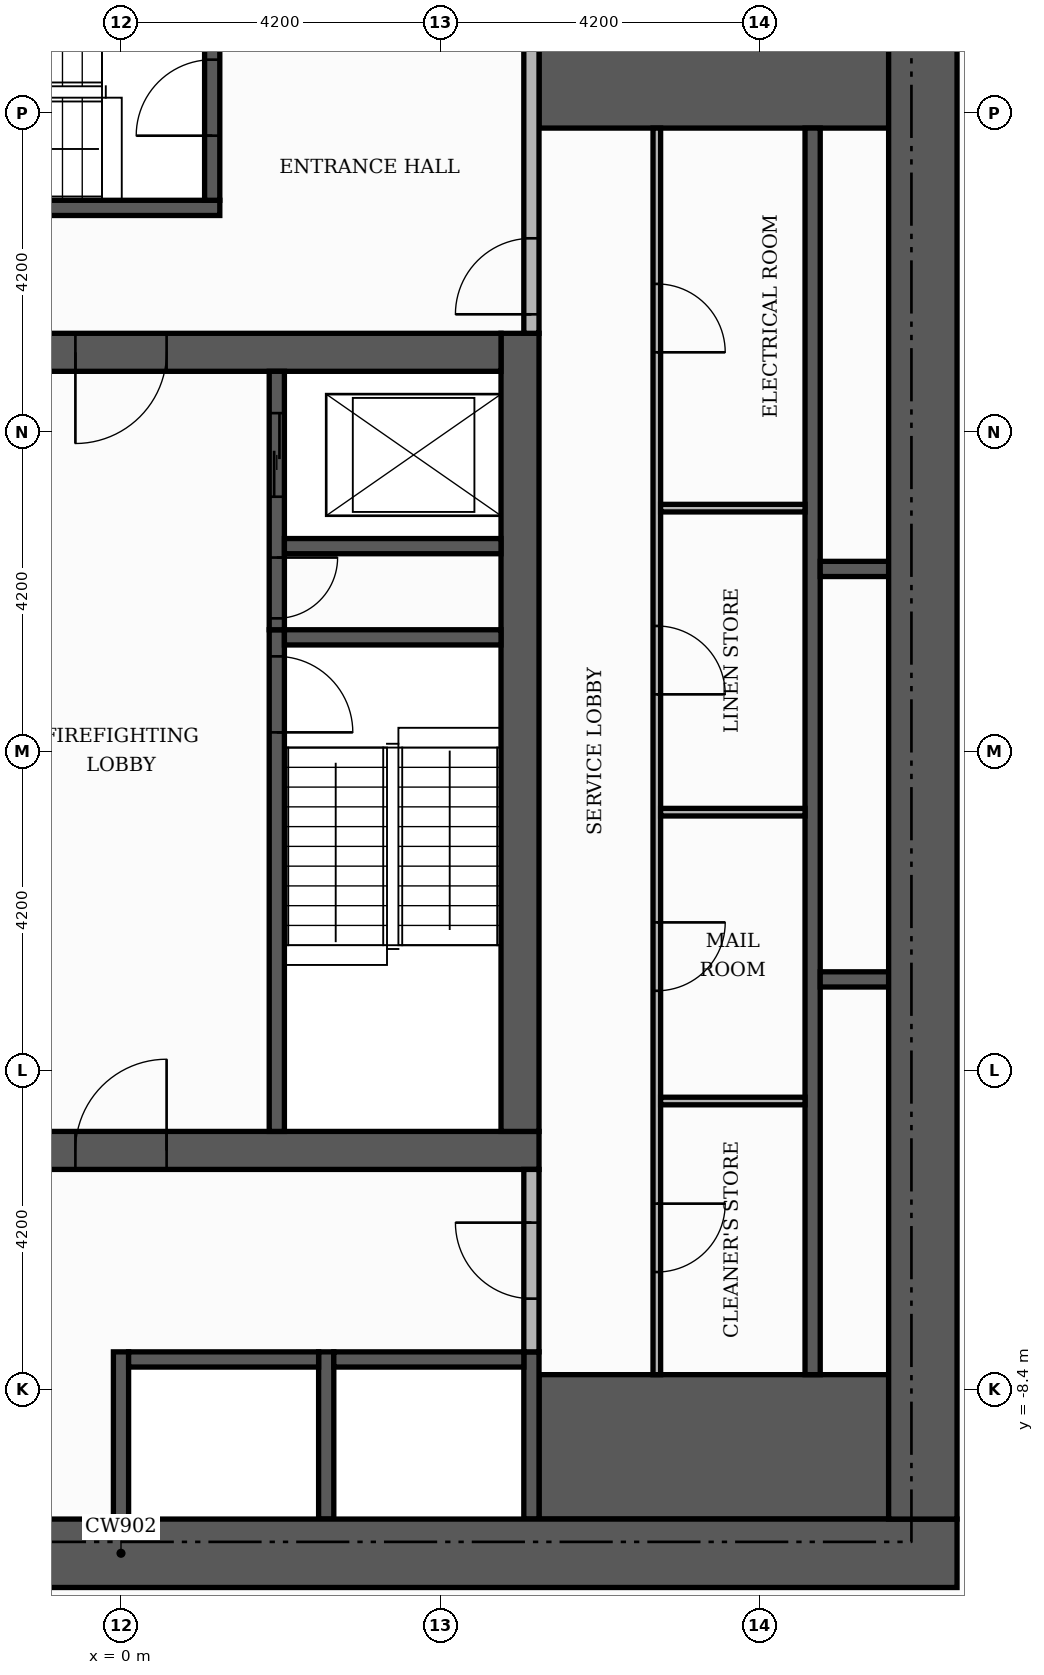
"""IFC4 building model, lengths in metres.
Left out: names, types, materials, properties, quantities, classifications, styles, units other than length and angle.
Written with IfcOpenShell. Run it as: python <this file> out.ifc"""

import sys

from ifc_helpers import new_model, si_unit, direction, frame, frame_2d, origin, place, context, subcontext, project, spatial, rectangle, extrude, element, fill, save


model = new_model("IFC4")
c1 = context("Model", 3, precision=1e-05, world=origin(), true_north=direction((0.0, 1.0)))
c2 = subcontext(c1, "Body", "Model", "MODEL_VIEW")
j1 = project(units=[si_unit("LENGTHUNIT", "METRE"), si_unit("PLANEANGLEUNIT", "RADIAN")], contexts=[c1])
p1 = place(None, origin())
s1 = spatial("IfcSite", under=j1, at=p1, CompositionType="ELEMENT")
p2 = place(p1, origin())
s2 = spatial("IfcBuilding", under=s1, at=p2, CompositionType="ELEMENT")
p3 = place(p2, frame((0.0, 0.0, 114.3)))
s3 = spatial("IfcBuildingStorey", under=s2, at=p3, CompositionType="ELEMENT", Elevation=114.3)
p4 = place(p3, frame((-5.5, -5.25, 0.0), z_axis=(0.0, 0.0, 1.0), x_axis=(1.0, 0.0, 0.0)))
e1 = element("IfcWall", 1, at=p4, inside=s3, PredefinedType="SHEAR", context=c2, shape_type="SweptSolid", body=[
    extrude(rectangle(XDim=11.0, YDim=0.5, at=frame_2d((5.5, 0.0))), origin(), (0.0, 0.0, 1.0), 3.48),
])
p5 = place(p4, frame((4.9, 0.0, 0.0)))
e2 = element("IfcOpeningElement", 2, at=p5, cuts=e1, PredefinedType="OPENING", context=c2, shape_type="SweptSolid", body=[
    extrude(rectangle(XDim=1.2, YDim=2.1, at=frame_2d((0.6, 1.05))), frame((0.0, 0.26, 0.0), z_axis=(0.0, -1.0, 0.0), x_axis=(1.0, 0.0, 0.0)), (0.0, 0.0, 1.0), 0.52),
])
p6 = place(p3, frame((5.25, -5.0, 0.0), z_axis=(0.0, 0.0, 1.0), x_axis=(0.0, 1.0, 0.0)))
e3 = element("IfcWall", 3, at=p6, inside=s3, PredefinedType="SHEAR", context=c2, shape_type="SweptSolid", body=[
    extrude(rectangle(XDim=10.5, YDim=0.5, at=frame_2d((5.25, 0.0))), origin(), (0.0, 0.0, 1.0), 3.48),
])
p7 = place(p3, frame((-5.0, 5.25, 0.0), z_axis=(0.0, 0.0, 1.0), x_axis=(1.0, 0.0, 0.0)))
e4 = element("IfcWall", 4, at=p7, inside=s3, PredefinedType="SHEAR", context=c2, shape_type="SweptSolid", body=[
    extrude(rectangle(XDim=10.0, YDim=0.5, at=frame_2d((5.0, 0.0))), origin(), (0.0, 0.0, 1.0), 3.48),
])
p8 = place(p7, frame((4.4, 0.0, 0.0)))
e5 = element("IfcOpeningElement", 5, at=p8, cuts=e4, PredefinedType="OPENING", context=c2, shape_type="SweptSolid", body=[
    extrude(rectangle(XDim=1.2, YDim=2.1, at=frame_2d((0.6, 1.05))), frame((0.0, 0.26, 0.0), z_axis=(0.0, -1.0, 0.0), x_axis=(1.0, 0.0, 0.0)), (0.0, 0.0, 1.0), 0.52),
])
for number, where, z_axis, x_axis in (
    (6, (5.5, -9.15, 0.0), (0.0, 0.0, 1.0), (1.0, 0.0, 0.0)),
    (7, (5.5, 9.15, 0.0), (0.0, 0.0, 1.0), (1.0, 0.0, 0.0)),
):
    element("IfcWall", number, at=place(p3, frame(where, z_axis=z_axis, x_axis=x_axis)), inside=s3, PredefinedType="SHEAR", context=c2, shape_type="SweptSolid", body=[
        extrude(rectangle(XDim=4.6, YDim=1.9, at=frame_2d((2.3, 0.0))), origin(), (0.0, 0.0, 1.0), 3.48),
    ])
p9 = place(p3, frame((2.05, -5.0, 0.0), z_axis=(0.0, 0.0, 1.0), x_axis=(0.0, 1.0, 0.0)))
e8 = element("IfcWall", 8, at=p9, inside=s3, PredefinedType="SHEAR", context=c2, shape_type="SweptSolid", body=[
    extrude(rectangle(XDim=6.6, YDim=0.2, at=frame_2d((3.3, 0.0))), origin(), (0.0, 0.0, 1.0), 3.48),
])
p10 = place(p9, frame((5.25, 0.0, 0.0)))
e9 = element("IfcOpeningElement", 9, at=p10, cuts=e8, PredefinedType="OPENING", context=c2, shape_type="SweptSolid", body=[
    extrude(rectangle(XDim=1.0, YDim=2.1, at=frame_2d((0.5, 1.05))), frame((0.0, 0.11, 0.0), z_axis=(0.0, -1.0, 0.0), x_axis=(1.0, 0.0, 0.0)), (0.0, 0.0, 1.0), 0.22),
])
p11 = place(p3, frame((2.15, 1.5, 0.0), z_axis=(0.0, 0.0, 1.0), x_axis=(1.0, 0.0, 0.0)))
e10 = element("IfcWall", 10, at=p11, inside=s3, PredefinedType="SHEAR", context=c2, shape_type="SweptSolid", body=[
    extrude(rectangle(XDim=2.85, YDim=0.2, at=frame_2d((1.425, 0.0))), origin(), (0.0, 0.0, 1.0), 3.48),
])
p12 = place(p3, frame((-5.5, 7.15, 0.0), z_axis=(0.0, 0.0, 1.0), x_axis=(1.0, 0.0, 0.0)))
e11 = element("IfcWall", 11, at=p12, inside=s3, PredefinedType="SHEAR", context=c2, shape_type="SweptSolid", body=[
    extrude(rectangle(XDim=6.8, YDim=0.2, at=frame_2d((3.4, 0.0))), origin(), (0.0, 0.0, 1.0), 3.48),
])
p13 = place(p3, frame((1.2, 7.25, 0.0), z_axis=(0.0, 0.0, 1.0), x_axis=(0.0, 1.0, 0.0)))
e12 = element("IfcWall", 12, at=p13, inside=s3, PredefinedType="SHEAR", context=c2, shape_type="SweptSolid", body=[
    extrude(rectangle(XDim=2.85, YDim=0.2, at=frame_2d((1.425, 0.0))), origin(), (0.0, 0.0, 1.0), 3.48),
])
p14 = place(p13, frame((0.85, 0.0, 0.0)))
e13 = element("IfcOpeningElement", 13, at=p14, cuts=e12, PredefinedType="OPENING", context=c2, shape_type="SweptSolid", body=[
    extrude(rectangle(XDim=1.0, YDim=2.1, at=frame_2d((0.5, 1.05))), frame((0.0, 0.11, 0.0), z_axis=(0.0, -1.0, 0.0), x_axis=(1.0, 0.0, 0.0)), (0.0, 0.0, 1.0), 0.22),
])
for number, where, z_axis, x_axis in (
    (14, (0.0, -10.1, 0.0), (0.0, 0.0, 1.0), (0.0, 1.0, 0.0)),
    (15, (2.7, -10.1, 0.0), (0.0, 0.0, 1.0), (0.0, 1.0, 0.0)),
    (16, (5.4, -10.1, 0.0), (0.0, 0.0, 1.0), (0.0, 1.0, 0.0)),
):
    element("IfcWall", number, at=place(p3, frame(where, z_axis=z_axis, x_axis=x_axis)), inside=s3, PredefinedType="SHEAR", context=c2, shape_type="SweptSolid", body=[
        extrude(rectangle(XDim=2.2, YDim=0.2, at=frame_2d((1.1, 0.0))), origin(), (0.0, 0.0, 1.0), 3.48),
    ])
p15 = place(p3, frame((9.1, -8.2, 0.0), z_axis=(0.0, 0.0, 1.0), x_axis=(0.0, 1.0, 0.0)))
e17 = element("IfcWall", 17, at=p15, inside=s3, PredefinedType="SHEAR", context=c2, shape_type="SweptSolid", body=[
    extrude(rectangle(XDim=16.4, YDim=0.2, at=frame_2d((8.2, 0.0))), origin(), (0.0, 0.0, 1.0), 3.48),
])
for number, where, z_axis, x_axis in (
    (18, (0.1, -8.0, 0.0), (0.0, 0.0, 1.0), (1.0, 0.0, 0.0)),
    (19, (2.8, -8.0, 0.0), (0.0, 0.0, 1.0), (1.0, 0.0, 0.0)),
):
    element("IfcWall", number, at=place(p3, frame(where, z_axis=z_axis, x_axis=x_axis)), inside=s3, PredefinedType="SHEAR", context=c2, shape_type="SweptSolid", body=[
        extrude(rectangle(XDim=2.5, YDim=0.2, at=frame_2d((1.25, 0.0))), origin(), (0.0, 0.0, 1.0), 3.48),
    ])
p16 = place(p3, frame((9.2, -3.0, 0.0), z_axis=(0.0, 0.0, 1.0), x_axis=(1.0, 0.0, 0.0)))
e20 = element("IfcWall", 20, at=p16, inside=s3, PredefinedType="SHEAR", context=c2, shape_type="SweptSolid", body=[
    extrude(rectangle(XDim=0.9, YDim=0.2, at=frame_2d((0.45, 0.0))), origin(), (0.0, 0.0, 1.0), 3.48),
])
p17 = place(p3, frame((2.05, 1.6, 0.0), z_axis=(0.0, 0.0, 1.0), x_axis=(0.0, 1.0, 0.0)))
e21 = element("IfcWall", 21, at=p17, inside=s3, PredefinedType="SHEAR", context=c2, shape_type="SweptSolid", body=[
    extrude(rectangle(XDim=3.4, YDim=0.2, at=frame_2d((1.7, 0.0))), origin(), (0.0, 0.0, 1.0), 3.48),
])
p18 = place(p17, frame((1.75, 0.0, 0.0)))
e22 = element("IfcOpeningElement", 22, at=p18, cuts=e21, PredefinedType="OPENING", context=c2, shape_type="SweptSolid", body=[
    extrude(rectangle(XDim=1.1, YDim=2.1, at=frame_2d((0.55, 1.05))), frame((0.0, 0.11, 0.0), z_axis=(0.0, -1.0, 0.0), x_axis=(1.0, 0.0, 0.0)), (0.0, 0.0, 1.0), 0.22),
])
p19 = place(p17, frame((0.15, 0.0, 0.0)))
e23 = element("IfcOpeningElement", 23, at=p19, cuts=e21, PredefinedType="OPENING", context=c2, shape_type="SweptSolid", body=[
    extrude(rectangle(XDim=0.8, YDim=2.1, at=frame_2d((0.4, 1.05))), frame((0.0, 0.11, 0.0), z_axis=(0.0, -1.0, 0.0), x_axis=(1.0, 0.0, 0.0)), (0.0, 0.0, 1.0), 0.22),
])
p20 = place(p3, frame((9.2, 2.4, 0.0), z_axis=(0.0, 0.0, 1.0), x_axis=(1.0, 0.0, 0.0)))
e24 = element("IfcWall", 24, at=p20, inside=s3, PredefinedType="SHEAR", context=c2, shape_type="SweptSolid", body=[
    extrude(rectangle(XDim=0.9, YDim=0.2, at=frame_2d((0.45, 0.0))), origin(), (0.0, 0.0, 1.0), 3.48),
])
p21 = place(p3, frame((2.15, 2.7, 0.0), z_axis=(0.0, 0.0, 1.0), x_axis=(1.0, 0.0, 0.0)))
e25 = element("IfcWall", 25, at=p21, inside=s3, PredefinedType="SHEAR", context=c2, shape_type="SweptSolid", body=[
    extrude(rectangle(XDim=2.85, YDim=0.2, at=frame_2d((1.425, 0.0))), origin(), (0.0, 0.0, 1.0), 3.48),
])
p22 = place(p3, frame((-11.0, -10.55, 0.0), z_axis=(0.0, 0.0, 1.0), x_axis=(1.0, 0.0, 0.0)))
e26 = element("IfcWall", 26, at=p22, inside=s3, PredefinedType="SHEAR", context=c2, shape_type="SweptSolid", body=[
    extrude(rectangle(XDim=22.0, YDim=0.9, at=frame_2d((11.0, 0.0))), origin(), (0.0, 0.0, 1.0), 3.48),
])
p23 = place(p22, frame((7.4, 0.0, 0.0)))
e27 = element("IfcOpeningElement", 27, at=p23, cuts=e26, PredefinedType="OPENING", context=c2, shape_type="SweptSolid", body=[
    extrude(rectangle(XDim=1.8, YDim=2.2, at=frame_2d((0.9, 1.1))), frame((0.0, 0.46, 0.0), z_axis=(0.0, -1.0, 0.0), x_axis=(1.0, 0.0, 0.0)), (0.0, 0.0, 1.0), 0.92),
])
p24 = place(p3, frame((10.55, -10.1, 0.0), z_axis=(0.0, 0.0, 1.0), x_axis=(0.0, 1.0, 0.0)))
e28 = element("IfcWall", 28, at=p24, inside=s3, PredefinedType="SHEAR", context=c2, shape_type="SweptSolid", body=[
    extrude(rectangle(XDim=20.2, YDim=0.9, at=frame_2d((10.1, 0.0))), origin(), (0.0, 0.0, 1.0), 3.48),
])
p25 = place(p3, frame((7.05, -8.2, 0.0), z_axis=(0.0, 0.0, 1.0), x_axis=(0.0, 1.0, 0.0)))
e29 = element("IfcWall", 29, at=p25, inside=s3, PredefinedType="PARTITIONING", context=c2, shape_type="SweptSolid", body=[
    extrude(rectangle(XDim=16.4, YDim=0.1, at=frame_2d((8.2, 0.0))), origin(), (0.0, 0.0, 1.0), 3.48),
])
p26 = place(p25, frame((1.35, 0.0, 0.0)))
e30 = element("IfcOpeningElement", 30, at=p26, cuts=e29, PredefinedType="OPENING", context=c2, shape_type="SweptSolid", body=[
    extrude(rectangle(XDim=0.9, YDim=2.1, at=frame_2d((0.45, 1.05))), frame((0.0, 0.06, 0.0), z_axis=(0.0, -1.0, 0.0), x_axis=(1.0, 0.0, 0.0)), (0.0, 0.0, 1.0), 0.12),
])
p27 = place(p25, frame((5.05, 0.0, 0.0)))
e31 = element("IfcOpeningElement", 31, at=p27, cuts=e29, PredefinedType="OPENING", context=c2, shape_type="SweptSolid", body=[
    extrude(rectangle(XDim=0.9, YDim=2.1, at=frame_2d((0.45, 1.05))), frame((0.0, 0.06, 0.0), z_axis=(0.0, -1.0, 0.0), x_axis=(1.0, 0.0, 0.0)), (0.0, 0.0, 1.0), 0.12),
])
p28 = place(p25, frame((8.95, 0.0, 0.0)))
e32 = element("IfcOpeningElement", 32, at=p28, cuts=e29, PredefinedType="OPENING", context=c2, shape_type="SweptSolid", body=[
    extrude(rectangle(XDim=0.9, YDim=2.1, at=frame_2d((0.45, 1.05))), frame((0.0, 0.06, 0.0), z_axis=(0.0, -1.0, 0.0), x_axis=(1.0, 0.0, 0.0)), (0.0, 0.0, 1.0), 0.12),
])
p29 = place(p25, frame((13.45, 0.0, 0.0)))
e33 = element("IfcOpeningElement", 33, at=p29, cuts=e29, PredefinedType="OPENING", context=c2, shape_type="SweptSolid", body=[
    extrude(rectangle(XDim=0.9, YDim=2.1, at=frame_2d((0.45, 1.05))), frame((0.0, 0.06, 0.0), z_axis=(0.0, -1.0, 0.0), x_axis=(1.0, 0.0, 0.0)), (0.0, 0.0, 1.0), 0.12),
])
p30 = place(p3, frame((5.4, -7.9, 0.0), z_axis=(0.0, 0.0, 1.0), x_axis=(0.0, 1.0, 0.0)))
e34 = element("IfcWall", 34, at=p30, inside=s3, PredefinedType="PARTITIONING", context=c2, shape_type="SweptSolid", body=[
    extrude(rectangle(XDim=2.4, YDim=0.2, at=frame_2d((1.2, 0.0))), origin(), (0.0, 0.0, 1.0), 3.48),
])
p31 = place(p30, frame((0.7, 0.0, 0.0)))
e35 = element("IfcOpeningElement", 35, at=p31, cuts=e34, PredefinedType="OPENING", context=c2, shape_type="SweptSolid", body=[
    extrude(rectangle(XDim=1.0, YDim=2.1, at=frame_2d((0.5, 1.05))), frame((0.0, 0.11, 0.0), z_axis=(0.0, -1.0, 0.0), x_axis=(1.0, 0.0, 0.0)), (0.0, 0.0, 1.0), 0.22),
])
for number, where, z_axis, x_axis in (
    (36, (7.1, -4.6, 0.0), (0.0, 0.0, 1.0), (1.0, 0.0, 0.0)),
    (37, (7.1, -0.8, 0.0), (0.0, 0.0, 1.0), (1.0, 0.0, 0.0)),
    (38, (7.1, 3.2, 0.0), (0.0, 0.0, 1.0), (1.0, 0.0, 0.0)),
):
    element("IfcWall", number, at=place(p3, frame(where, z_axis=z_axis, x_axis=x_axis)), inside=s3, PredefinedType="PARTITIONING", context=c2, shape_type="SweptSolid", body=[
        extrude(rectangle(XDim=1.9, YDim=0.1, at=frame_2d((0.95, 0.0))), origin(), (0.0, 0.0, 1.0), 3.48),
    ])
p32 = place(p3, frame((5.4, 5.5, 0.0), z_axis=(0.0, 0.0, 1.0), x_axis=(0.0, 1.0, 0.0)))
e39 = element("IfcWall", 39, at=p32, inside=s3, PredefinedType="PARTITIONING", context=c2, shape_type="SweptSolid", body=[
    extrude(rectangle(XDim=4.6, YDim=0.2, at=frame_2d((2.3, 0.0))), origin(), (0.0, 0.0, 1.0), 3.48),
])
p33 = place(p32, frame((0.25, 0.0, 0.0)))
e40 = element("IfcOpeningElement", 40, at=p33, cuts=e39, PredefinedType="OPENING", context=c2, shape_type="SweptSolid", body=[
    extrude(rectangle(XDim=1.0, YDim=2.1, at=frame_2d((0.5, 1.05))), frame((0.0, 0.11, 0.0), z_axis=(0.0, -1.0, 0.0), x_axis=(1.0, 0.0, 0.0)), (0.0, 0.0, 1.0), 0.22),
])
p34 = place(p18, origin())
e41 = element("IfcDoor", 41, at=p34, inside=s3, OperationType="SLIDING_TO_LEFT", PredefinedType="DOOR", context=c2, shape_type="SweptSolid", body=[
    extrude(rectangle(XDim=1.1, YDim=2.1, at=frame_2d((0.55, 1.05))), frame((0.0, 0.025, 0.0), z_axis=(0.0, -1.0, 0.0), x_axis=(1.0, 0.0, 0.0)), (0.0, 0.0, 1.0), 0.05),
])
fill(e22, e41)
p35 = place(p10, frame((1.0, 0.0, 0.0), z_axis=(0.0, 0.0, 1.0), x_axis=(-1.0, 0.0, 0.0)))
e42 = element("IfcDoor", 42, at=p35, inside=s3, OperationType="SINGLE_SWING_LEFT", PredefinedType="DOOR", context=c2, shape_type="SweptSolid", body=[
    extrude(rectangle(XDim=1.0, YDim=2.1, at=frame_2d((0.5, 1.05))), frame((0.0, 0.025, 0.0), z_axis=(0.0, -1.0, 0.0), x_axis=(1.0, 0.0, 0.0)), (0.0, 0.0, 1.0), 0.05),
])
fill(e9, e42)
p36 = place(p19, frame((0.8, 0.0, 0.0), z_axis=(0.0, 0.0, 1.0), x_axis=(-1.0, 0.0, 0.0)))
e43 = element("IfcDoor", 43, at=p36, inside=s3, OperationType="SINGLE_SWING_RIGHT", PredefinedType="DOOR", context=c2, shape_type="SweptSolid", body=[
    extrude(rectangle(XDim=0.8, YDim=2.1, at=frame_2d((0.4, 1.05))), frame((0.0, 0.025, 0.0), z_axis=(0.0, -1.0, 0.0), x_axis=(1.0, 0.0, 0.0)), (0.0, 0.0, 1.0), 0.05),
])
fill(e23, e43)
p37 = place(p8, frame((1.2, 0.0, 0.0), z_axis=(0.0, 0.0, 1.0), x_axis=(-1.0, 0.0, 0.0)))
e44 = element("IfcDoor", 44, at=p37, inside=s3, OperationType="SINGLE_SWING_LEFT", PredefinedType="DOOR", context=c2, shape_type="SweptSolid", body=[
    extrude(rectangle(XDim=1.2, YDim=2.1, at=frame_2d((0.6, 1.05))), frame((0.0, 0.025, 0.0), z_axis=(0.0, -1.0, 0.0), x_axis=(1.0, 0.0, 0.0)), (0.0, 0.0, 1.0), 0.05),
])
fill(e5, e44)
p38 = place(p5, origin())
e45 = element("IfcDoor", 45, at=p38, inside=s3, OperationType="SINGLE_SWING_RIGHT", PredefinedType="DOOR", context=c2, shape_type="SweptSolid", body=[
    extrude(rectangle(XDim=1.2, YDim=2.1, at=frame_2d((0.6, 1.05))), frame((0.0, 0.025, 0.0), z_axis=(0.0, -1.0, 0.0), x_axis=(1.0, 0.0, 0.0)), (0.0, 0.0, 1.0), 0.05),
])
fill(e2, e45)
p39 = place(p14, origin())
e46 = element("IfcDoor", 46, at=p39, inside=s3, OperationType="SINGLE_SWING_LEFT", PredefinedType="DOOR", context=c2, shape_type="SweptSolid", body=[
    extrude(rectangle(XDim=1.0, YDim=2.1, at=frame_2d((0.5, 1.05))), frame((0.0, 0.025, 0.0), z_axis=(0.0, -1.0, 0.0), x_axis=(1.0, 0.0, 0.0)), (0.0, 0.0, 1.0), 0.05),
])
fill(e13, e46)
p40 = place(p33, origin())
e47 = element("IfcDoor", 47, at=p40, inside=s3, OperationType="SINGLE_SWING_LEFT", PredefinedType="DOOR", context=c2, shape_type="SweptSolid", body=[
    extrude(rectangle(XDim=1.0, YDim=2.1, at=frame_2d((0.5, 1.05))), frame((0.0, 0.025, 0.0), z_axis=(0.0, -1.0, 0.0), x_axis=(1.0, 0.0, 0.0)), (0.0, 0.0, 1.0), 0.05),
])
fill(e40, e47)
p41 = place(p31, origin())
e48 = element("IfcDoor", 48, at=p41, inside=s3, OperationType="SINGLE_SWING_RIGHT", PredefinedType="DOOR", context=c2, shape_type="SweptSolid", body=[
    extrude(rectangle(XDim=1.0, YDim=2.1, at=frame_2d((0.5, 1.05))), frame((0.0, 0.025, 0.0), z_axis=(0.0, -1.0, 0.0), x_axis=(1.0, 0.0, 0.0)), (0.0, 0.0, 1.0), 0.05),
])
fill(e35, e48)
p42 = place(p26, frame((0.9, 0.0, 0.0), z_axis=(0.0, 0.0, 1.0), x_axis=(-1.0, 0.0, 0.0)))
e49 = element("IfcDoor", 49, at=p42, inside=s3, OperationType="SINGLE_SWING_RIGHT", PredefinedType="DOOR", context=c2, shape_type="SweptSolid", body=[
    extrude(rectangle(XDim=0.9, YDim=2.1, at=frame_2d((0.45, 1.05))), frame((0.0, 0.025, 0.0), z_axis=(0.0, -1.0, 0.0), x_axis=(1.0, 0.0, 0.0)), (0.0, 0.0, 1.0), 0.05),
])
fill(e30, e49)
p43 = place(p27, frame((0.9, 0.0, 0.0), z_axis=(0.0, 0.0, 1.0), x_axis=(-1.0, 0.0, 0.0)))
e50 = element("IfcDoor", 50, at=p43, inside=s3, OperationType="SINGLE_SWING_RIGHT", PredefinedType="DOOR", context=c2, shape_type="SweptSolid", body=[
    extrude(rectangle(XDim=0.9, YDim=2.1, at=frame_2d((0.45, 1.05))), frame((0.0, 0.025, 0.0), z_axis=(0.0, -1.0, 0.0), x_axis=(1.0, 0.0, 0.0)), (0.0, 0.0, 1.0), 0.05),
])
fill(e31, e50)
p44 = place(p28, frame((0.9, 0.0, 0.0), z_axis=(0.0, 0.0, 1.0), x_axis=(-1.0, 0.0, 0.0)))
e51 = element("IfcDoor", 51, at=p44, inside=s3, OperationType="SINGLE_SWING_LEFT", PredefinedType="DOOR", context=c2, shape_type="SweptSolid", body=[
    extrude(rectangle(XDim=0.9, YDim=2.1, at=frame_2d((0.45, 1.05))), frame((0.0, 0.025, 0.0), z_axis=(0.0, -1.0, 0.0), x_axis=(1.0, 0.0, 0.0)), (0.0, 0.0, 1.0), 0.05),
])
fill(e32, e51)
p45 = place(p29, frame((0.9, 0.0, 0.0), z_axis=(0.0, 0.0, 1.0), x_axis=(-1.0, 0.0, 0.0)))
e52 = element("IfcDoor", 52, at=p45, inside=s3, OperationType="SINGLE_SWING_LEFT", PredefinedType="DOOR", context=c2, shape_type="SweptSolid", body=[
    extrude(rectangle(XDim=0.9, YDim=2.1, at=frame_2d((0.45, 1.05))), frame((0.0, 0.025, 0.0), z_axis=(0.0, -1.0, 0.0), x_axis=(1.0, 0.0, 0.0)), (0.0, 0.0, 1.0), 0.05),
])
fill(e33, e52)
save(model, sys.argv[1])
